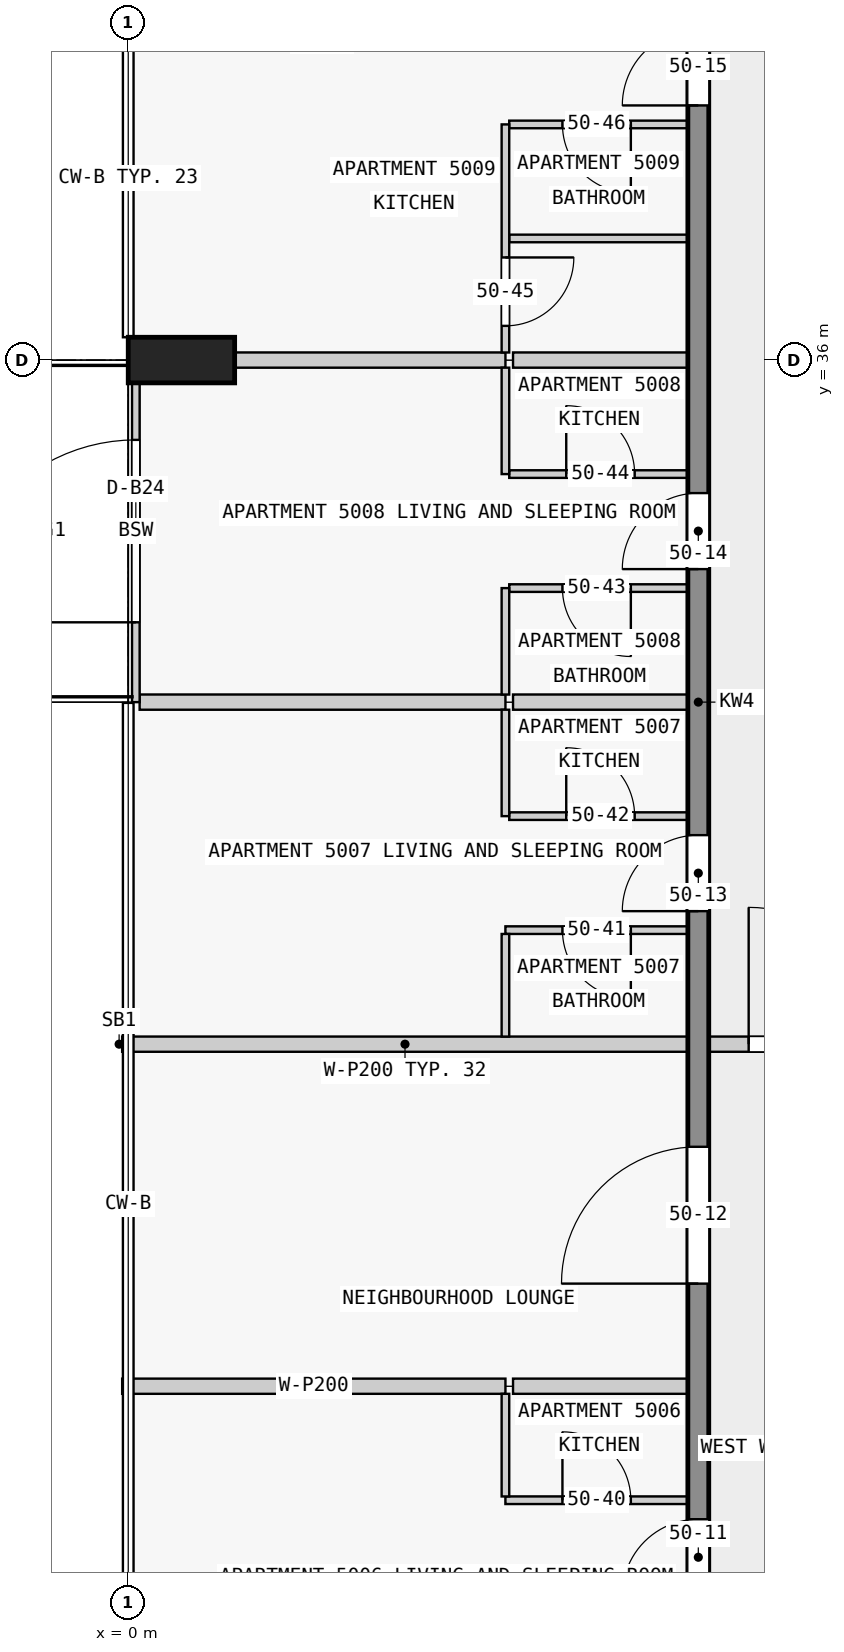
"""IFC4 building model, lengths in metres.
Left out: names, types, materials, properties, quantities, classifications, styles, units other than length and angle.
Written with IfcOpenShell. Run it as: python <this file> out.ifc"""

import sys

from ifc_helpers import new_model, si_unit, direction, frame, frame_2d, origin, origin_2d, place, context, subcontext, project, spatial, rectangle, extrude, element, fill, save


model = new_model("IFC4")
c1 = context("Model", 3, precision=1e-05, world=origin(), true_north=direction((0.0, 1.0)))
c2 = subcontext(c1, "Body", "Model", "MODEL_VIEW")
j1 = project(units=[si_unit("LENGTHUNIT", "METRE"), si_unit("PLANEANGLEUNIT", "RADIAN")], contexts=[c1])
p1 = place(None, origin())
s1 = spatial("IfcSite", under=j1, at=p1, CompositionType="ELEMENT")
p2 = place(p1, origin())
s2 = spatial("IfcBuilding", under=s1, at=p2, CompositionType="ELEMENT")
p3 = place(p2, frame((0.0, 0.0, 194.4)))
s3 = spatial("IfcBuildingStorey", under=s2, at=p3, CompositionType="ELEMENT", Elevation=194.4)
p4 = place(p3, frame((0.7, 36.0, 0.0), z_axis=(0.0, 0.0, 1.0), x_axis=(0.0, 1.0, 0.0)))
e1 = element("IfcColumn", 1, at=p4, inside=s3, PredefinedType="COLUMN", context=c2, shape_type="SweptSolid", body=[
    extrude(rectangle(XDim=0.6, YDim=1.4, at=origin_2d()), origin(), (0.0, 0.0, 1.0), 3.5),
])
p5 = place(p3, frame((7.5, 18.0, 0.0), z_axis=(0.0, 0.0, 1.0), x_axis=(0.0, 1.0, 0.0)))
e2 = element("IfcWall", 2, at=p5, inside=s3, PredefinedType="SHEAR", context=c2, shape_type="SweptSolid", body=[
    extrude(rectangle(XDim=27.0, YDim=0.275, at=frame_2d((13.5, 0.0))), origin(), (0.0, 0.0, 1.0), 3.25),
])
p6 = place(p5, frame((1.75, 0.0, 0.0)))
e3 = element("IfcOpeningElement", 3, at=p6, cuts=e2, PredefinedType="OPENING", context=c2, shape_type="SweptSolid", body=[
    extrude(rectangle(XDim=1.0, YDim=2.1, at=frame_2d((0.5, 1.05))), frame((0.0, 0.147, 0.0), z_axis=(0.0, -1.0, 0.0), x_axis=(1.0, 0.0, 0.0)), (0.0, 0.0, 1.0), 0.295),
])
p7 = place(p5, frame((5.85, 0.0, 0.0)))
e4 = element("IfcOpeningElement", 4, at=p7, cuts=e2, PredefinedType="OPENING", context=c2, shape_type="SweptSolid", body=[
    extrude(rectangle(XDim=1.8, YDim=2.1, at=frame_2d((0.9, 1.05))), frame((0.0, 0.147, 0.0), z_axis=(0.0, -1.0, 0.0), x_axis=(1.0, 0.0, 0.0)), (0.0, 0.0, 1.0), 0.295),
])
p8 = place(p5, frame((10.75, 0.0, 0.0)))
e5 = element("IfcOpeningElement", 5, at=p8, cuts=e2, PredefinedType="OPENING", context=c2, shape_type="SweptSolid", body=[
    extrude(rectangle(XDim=1.0, YDim=2.1, at=frame_2d((0.5, 1.05))), frame((0.0, 0.147, 0.0), z_axis=(0.0, -1.0, 0.0), x_axis=(1.0, 0.0, 0.0)), (0.0, 0.0, 1.0), 0.295),
])
p9 = place(p5, frame((15.25, 0.0, 0.0)))
e6 = element("IfcOpeningElement", 6, at=p9, cuts=e2, PredefinedType="OPENING", context=c2, shape_type="SweptSolid", body=[
    extrude(rectangle(XDim=1.0, YDim=2.1, at=frame_2d((0.5, 1.05))), frame((0.0, 0.147, 0.0), z_axis=(0.0, -1.0, 0.0), x_axis=(1.0, 0.0, 0.0)), (0.0, 0.0, 1.0), 0.295),
])
p10 = place(p5, frame((21.35, 0.0, 0.0)))
e7 = element("IfcOpeningElement", 7, at=p10, cuts=e2, PredefinedType="OPENING", context=c2, shape_type="SweptSolid", body=[
    extrude(rectangle(XDim=1.0, YDim=2.1, at=frame_2d((0.5, 1.05))), frame((0.0, 0.147, 0.0), z_axis=(0.0, -1.0, 0.0), x_axis=(1.0, 0.0, 0.0)), (0.0, 0.0, 1.0), 0.295),
])
p11 = place(p3, frame((0.1, 31.5, 0.0), z_axis=(0.0, 0.0, 1.0), x_axis=(0.0, 1.0, 0.0)))
e8 = element("IfcWall", 8, at=p11, inside=s3, PredefinedType="STANDARD", context=c2, shape_type="SweptSolid", body=[
    extrude(rectangle(XDim=4.5, YDim=0.1, at=frame_2d((2.25, 0.0))), origin(), (0.0, 0.0, 1.0), 3.25),
])
p12 = place(p11, frame((1.05, 0.0, 0.0)))
e9 = element("IfcOpeningElement", 9, at=p12, cuts=e8, PredefinedType="OPENING", context=c2, shape_type="SweptSolid", body=[
    extrude(rectangle(XDim=2.4, YDim=2.4, at=frame_2d((1.2, 1.2))), frame((0.0, 0.06, 0.0), z_axis=(0.0, -1.0, 0.0), x_axis=(1.0, 0.0, 0.0)), (0.0, 0.0, 1.0), 0.12),
])
p13 = place(p3, frame((4.962, 21.0, 0.0), z_axis=(0.0, 0.0, 1.0), x_axis=(1.0, 0.0, 0.0)))
e10 = element("IfcWall", 10, at=p13, inside=s3, PredefinedType="PARTITIONING", context=c2, shape_type="SweptSolid", body=[
    extrude(rectangle(XDim=2.4, YDim=0.1, at=frame_2d((1.2, 0.0))), origin(), (0.0, 0.0, 1.0), 3.25),
])
p14 = place(p13, frame((0.75, 0.0, 0.0)))
e11 = element("IfcOpeningElement", 11, at=p14, cuts=e10, PredefinedType="OPENING", context=c2, shape_type="SweptSolid", body=[
    extrude(rectangle(XDim=0.9, YDim=2.1, at=frame_2d((0.45, 1.05))), frame((0.0, 0.06, 0.0), z_axis=(0.0, -1.0, 0.0), x_axis=(1.0, 0.0, 0.0)), (0.0, 0.0, 1.0), 0.12),
])
p15 = place(p3, frame((7.363, 22.5, 0.0), z_axis=(0.0, 0.0, 1.0), x_axis=(-1.0, 0.0, 0.0)))
e12 = element("IfcWall", 12, at=p15, inside=s3, PredefinedType="PARTITIONING", context=c2, shape_type="SweptSolid", body=[
    extrude(rectangle(XDim=2.3, YDim=0.2, at=frame_2d((1.15, 0.0))), origin(), (0.0, 0.0, 1.0), 3.25),
])
p16 = place(p3, frame((-0.08, 22.5, 0.0), z_axis=(0.0, 0.0, 1.0), x_axis=(1.0, 0.0, 0.0)))
e13 = element("IfcWall", 13, at=p16, inside=s3, PredefinedType="PARTITIONING", context=c2, shape_type="SweptSolid", body=[
    extrude(rectangle(XDim=5.042, YDim=0.2, at=frame_2d((2.521, 0.0))), origin(), (0.0, 0.0, 1.0), 3.25),
])
p17 = place(p3, frame((7.363, 27.0, 0.0), z_axis=(0.0, 0.0, 1.0), x_axis=(-1.0, 0.0, 0.0)))
e14 = element("IfcWall", 14, at=p17, inside=s3, PredefinedType="PARTITIONING", context=c2, shape_type="SweptSolid", body=[
    extrude(rectangle(XDim=7.443, YDim=0.2, at=frame_2d((3.721, 0.0))), origin(), (0.0, 0.0, 1.0), 3.25),
])
p18 = place(p3, frame((7.363, 28.5, 0.0), z_axis=(0.0, 0.0, 1.0), x_axis=(-1.0, 0.0, 0.0)))
e15 = element("IfcWall", 15, at=p18, inside=s3, PredefinedType="PARTITIONING", context=c2, shape_type="SweptSolid", body=[
    extrude(rectangle(XDim=2.4, YDim=0.1, at=frame_2d((1.2, 0.0))), origin(), (0.0, 0.0, 1.0), 3.25),
])
p19 = place(p18, frame((0.75, 0.0, 0.0)))
e16 = element("IfcOpeningElement", 16, at=p19, cuts=e15, PredefinedType="OPENING", context=c2, shape_type="SweptSolid", body=[
    extrude(rectangle(XDim=0.9, YDim=2.1, at=frame_2d((0.45, 1.05))), frame((0.0, 0.06, 0.0), z_axis=(0.0, -1.0, 0.0), x_axis=(1.0, 0.0, 0.0)), (0.0, 0.0, 1.0), 0.12),
])
p20 = place(p3, frame((5.012, 30.0, 0.0), z_axis=(0.0, 0.0, 1.0), x_axis=(1.0, 0.0, 0.0)))
e17 = element("IfcWall", 17, at=p20, inside=s3, PredefinedType="PARTITIONING", context=c2, shape_type="SweptSolid", body=[
    extrude(rectangle(XDim=2.35, YDim=0.1, at=frame_2d((1.175, 0.0))), origin(), (0.0, 0.0, 1.0), 3.25),
])
p21 = place(p20, frame((0.75, 0.0, 0.0)))
e18 = element("IfcOpeningElement", 18, at=p21, cuts=e17, PredefinedType="OPENING", context=c2, shape_type="SweptSolid", body=[
    extrude(rectangle(XDim=0.9, YDim=2.1, at=frame_2d((0.45, 1.05))), frame((0.0, 0.06, 0.0), z_axis=(0.0, -1.0, 0.0), x_axis=(1.0, 0.0, 0.0)), (0.0, 0.0, 1.0), 0.12),
])
p22 = place(p3, frame((7.363, 31.5, 0.0), z_axis=(0.0, 0.0, 1.0), x_axis=(-1.0, 0.0, 0.0)))
e19 = element("IfcWall", 19, at=p22, inside=s3, PredefinedType="PARTITIONING", context=c2, shape_type="SweptSolid", body=[
    extrude(rectangle(XDim=2.3, YDim=0.2, at=frame_2d((1.15, 0.0))), origin(), (0.0, 0.0, 1.0), 3.25),
])
p23 = place(p3, frame((0.15, 31.5, 0.0), z_axis=(0.0, 0.0, 1.0), x_axis=(1.0, 0.0, 0.0)))
e20 = element("IfcWall", 20, at=p23, inside=s3, PredefinedType="PARTITIONING", context=c2, shape_type="SweptSolid", body=[
    extrude(rectangle(XDim=4.812, YDim=0.2, at=frame_2d((2.406, 0.0))), origin(), (0.0, 0.0, 1.0), 3.25),
])
p24 = place(p3, frame((7.363, 33.0, 0.0), z_axis=(0.0, 0.0, 1.0), x_axis=(-1.0, 0.0, 0.0)))
e21 = element("IfcWall", 21, at=p24, inside=s3, PredefinedType="PARTITIONING", context=c2, shape_type="SweptSolid", body=[
    extrude(rectangle(XDim=2.35, YDim=0.1, at=frame_2d((1.175, 0.0))), origin(), (0.0, 0.0, 1.0), 3.25),
])
p25 = place(p24, frame((0.75, 0.0, 0.0)))
e22 = element("IfcOpeningElement", 22, at=p25, cuts=e21, PredefinedType="OPENING", context=c2, shape_type="SweptSolid", body=[
    extrude(rectangle(XDim=0.9, YDim=2.1, at=frame_2d((0.45, 1.05))), frame((0.0, 0.06, 0.0), z_axis=(0.0, -1.0, 0.0), x_axis=(1.0, 0.0, 0.0)), (0.0, 0.0, 1.0), 0.12),
])
p26 = place(p3, frame((5.012, 34.5, 0.0), z_axis=(0.0, 0.0, 1.0), x_axis=(1.0, 0.0, 0.0)))
e23 = element("IfcWall", 23, at=p26, inside=s3, PredefinedType="PARTITIONING", context=c2, shape_type="SweptSolid", body=[
    extrude(rectangle(XDim=2.35, YDim=0.1, at=frame_2d((1.175, 0.0))), origin(), (0.0, 0.0, 1.0), 3.25),
])
p27 = place(p26, frame((0.75, 0.0, 0.0)))
e24 = element("IfcOpeningElement", 24, at=p27, cuts=e23, PredefinedType="OPENING", context=c2, shape_type="SweptSolid", body=[
    extrude(rectangle(XDim=0.9, YDim=2.1, at=frame_2d((0.45, 1.05))), frame((0.0, 0.06, 0.0), z_axis=(0.0, -1.0, 0.0), x_axis=(1.0, 0.0, 0.0)), (0.0, 0.0, 1.0), 0.12),
])
p28 = place(p3, frame((7.363, 36.0, 0.0), z_axis=(0.0, 0.0, 1.0), x_axis=(-1.0, 0.0, 0.0)))
e25 = element("IfcWall", 25, at=p28, inside=s3, PredefinedType="PARTITIONING", context=c2, shape_type="SweptSolid", body=[
    extrude(rectangle(XDim=2.3, YDim=0.2, at=frame_2d((1.15, 0.0))), origin(), (0.0, 0.0, 1.0), 3.25),
])
p29 = place(p3, frame((1.4, 36.0, 0.0), z_axis=(0.0, 0.0, 1.0), x_axis=(1.0, 0.0, 0.0)))
e26 = element("IfcWall", 26, at=p29, inside=s3, PredefinedType="PARTITIONING", context=c2, shape_type="SweptSolid", body=[
    extrude(rectangle(XDim=3.562, YDim=0.2, at=frame_2d((1.781, 0.0))), origin(), (0.0, 0.0, 1.0), 3.25),
])
p30 = place(p3, frame((7.363, 37.6, 0.0), z_axis=(0.0, 0.0, 1.0), x_axis=(-1.0, 0.0, 0.0)))
e27 = element("IfcWall", 27, at=p30, inside=s3, PredefinedType="PARTITIONING", context=c2, shape_type="SweptSolid", body=[
    extrude(rectangle(XDim=2.35, YDim=0.1, at=frame_2d((1.175, 0.0))), origin(), (0.0, 0.0, 1.0), 3.25),
])
p31 = place(p3, frame((7.363, 39.1, 0.0), z_axis=(0.0, 0.0, 1.0), x_axis=(-1.0, 0.0, 0.0)))
e28 = element("IfcWall", 28, at=p31, inside=s3, PredefinedType="PARTITIONING", context=c2, shape_type="SweptSolid", body=[
    extrude(rectangle(XDim=2.35, YDim=0.1, at=frame_2d((1.175, 0.0))), origin(), (0.0, 0.0, 1.0), 3.25),
])
p32 = place(p31, frame((0.75, 0.0, 0.0)))
e29 = element("IfcOpeningElement", 29, at=p32, cuts=e28, PredefinedType="OPENING", context=c2, shape_type="SweptSolid", body=[
    extrude(rectangle(XDim=0.9, YDim=2.1, at=frame_2d((0.45, 1.05))), frame((0.0, 0.06, 0.0), z_axis=(0.0, -1.0, 0.0), x_axis=(1.0, 0.0, 0.0)), (0.0, 0.0, 1.0), 0.12),
])
for number, where, z_axis, x_axis in (
    (30, (4.962, 22.4, 0.0), (0.0, 0.0, 1.0), (0.0, -1.0, 0.0)),
    (31, (4.962, 28.45, 0.0), (0.0, 0.0, 1.0), (0.0, -1.0, 0.0)),
):
    element("IfcWall", number, at=place(p3, frame(where, z_axis=z_axis, x_axis=x_axis)), inside=s3, PredefinedType="PARTITIONING", context=c2, shape_type="SweptSolid", body=[
        extrude(rectangle(XDim=1.35, YDim=0.1, at=frame_2d((0.675, 0.0))), origin(), (0.0, 0.0, 1.0), 3.25),
    ])
for number, where, z_axis, x_axis in (
    (32, (4.962, 31.4, 0.0), (0.0, 0.0, 1.0), (0.0, -1.0, 0.0)),
    (33, (4.962, 33.0, 0.0), (0.0, 0.0, 1.0), (0.0, -1.0, 0.0)),
    (34, (4.962, 35.9, 0.0), (0.0, 0.0, 1.0), (0.0, -1.0, 0.0)),
):
    element("IfcWall", number, at=place(p3, frame(where, z_axis=z_axis, x_axis=x_axis)), inside=s3, PredefinedType="PARTITIONING", context=c2, shape_type="SweptSolid", body=[
        extrude(rectangle(XDim=1.4, YDim=0.1, at=frame_2d((0.7, 0.0))), origin(), (0.0, 0.0, 1.0), 3.25),
    ])
p33 = place(p3, frame((4.962, 39.1, 0.0), z_axis=(0.0, 0.0, 1.0), x_axis=(0.0, -1.0, 0.0)))
e35 = element("IfcWall", 35, at=p33, inside=s3, PredefinedType="PARTITIONING", context=c2, shape_type="SweptSolid", body=[
    extrude(rectangle(XDim=3.0, YDim=0.1, at=frame_2d((1.5, 0.0))), origin(), (0.0, 0.0, 1.0), 3.25),
])
p34 = place(p33, frame((1.75, 0.0, 0.0)))
e36 = element("IfcOpeningElement", 36, at=p34, cuts=e35, PredefinedType="OPENING", context=c2, shape_type="SweptSolid", body=[
    extrude(rectangle(XDim=0.9, YDim=2.1, at=frame_2d((0.45, 1.05))), frame((0.0, 0.06, 0.0), z_axis=(0.0, -1.0, 0.0), x_axis=(1.0, 0.0, 0.0)), (0.0, 0.0, 1.0), 0.12),
])
p35 = place(p3, frame((7.462, 27.0, 0.0), z_axis=(0.0, 0.0, 1.0), x_axis=(1.0, 0.0, 0.0)))
e37 = element("IfcWall", 37, at=p35, inside=s3, PredefinedType="PARTITIONING", context=c2, shape_type="SweptSolid", body=[
    extrude(rectangle(XDim=3.175, YDim=0.2, at=frame_2d((1.587, 0.0))), origin(), (0.0, 0.0, 1.0), 3.25),
])
p36 = place(p35, frame((0.7, 0.0, 0.0)))
e38 = element("IfcOpeningElement", 38, at=p36, cuts=e37, PredefinedType="OPENING", context=c2, shape_type="SweptSolid", body=[
    extrude(rectangle(XDim=1.8, YDim=2.1, at=frame_2d((0.9, 1.05))), frame((0.0, 0.11, 0.0), z_axis=(0.0, -1.0, 0.0), x_axis=(1.0, 0.0, 0.0)), (0.0, 0.0, 1.0), 0.22),
])
p37 = place(p12, origin())
e39 = element("IfcDoor", 39, at=p37, inside=s3, OperationType="SINGLE_SWING_LEFT", PredefinedType="DOOR", context=c2, shape_type="SweptSolid", body=[
    extrude(rectangle(XDim=2.4, YDim=2.4, at=frame_2d((1.2, 1.2))), frame((0.0, 0.025, 0.0), z_axis=(0.0, -1.0, 0.0), x_axis=(1.0, 0.0, 0.0)), (0.0, 0.0, 1.0), 0.05),
])
fill(e9, e39)
p38 = place(p6, origin())
e40 = element("IfcDoor", 40, at=p38, inside=s3, OperationType="SINGLE_SWING_LEFT", PredefinedType="DOOR", context=c2, shape_type="SweptSolid", body=[
    extrude(rectangle(XDim=1.0, YDim=2.1, at=frame_2d((0.5, 1.05))), frame((0.0, 0.025, 0.0), z_axis=(0.0, -1.0, 0.0), x_axis=(1.0, 0.0, 0.0)), (0.0, 0.0, 1.0), 0.05),
])
fill(e3, e40)
p39 = place(p7, origin())
e41 = element("IfcDoor", 41, at=p39, inside=s3, OperationType="SINGLE_SWING_LEFT", PredefinedType="DOOR", context=c2, shape_type="SweptSolid", body=[
    extrude(rectangle(XDim=1.8, YDim=2.1, at=frame_2d((0.9, 1.05))), frame((0.0, 0.025, 0.0), z_axis=(0.0, -1.0, 0.0), x_axis=(1.0, 0.0, 0.0)), (0.0, 0.0, 1.0), 0.05),
])
fill(e4, e41)
p40 = place(p8, origin())
e42 = element("IfcDoor", 42, at=p40, inside=s3, OperationType="SINGLE_SWING_LEFT", PredefinedType="DOOR", context=c2, shape_type="SweptSolid", body=[
    extrude(rectangle(XDim=1.0, YDim=2.1, at=frame_2d((0.5, 1.05))), frame((0.0, 0.025, 0.0), z_axis=(0.0, -1.0, 0.0), x_axis=(1.0, 0.0, 0.0)), (0.0, 0.0, 1.0), 0.05),
])
fill(e5, e42)
p41 = place(p9, origin())
e43 = element("IfcDoor", 43, at=p41, inside=s3, OperationType="SINGLE_SWING_RIGHT", PredefinedType="DOOR", context=c2, shape_type="SweptSolid", body=[
    extrude(rectangle(XDim=1.0, YDim=2.1, at=frame_2d((0.5, 1.05))), frame((0.0, 0.025, 0.0), z_axis=(0.0, -1.0, 0.0), x_axis=(1.0, 0.0, 0.0)), (0.0, 0.0, 1.0), 0.05),
])
fill(e6, e43)
p42 = place(p10, origin())
e44 = element("IfcDoor", 44, at=p42, inside=s3, OperationType="SINGLE_SWING_RIGHT", PredefinedType="DOOR", context=c2, shape_type="SweptSolid", body=[
    extrude(rectangle(XDim=1.0, YDim=2.1, at=frame_2d((0.5, 1.05))), frame((0.0, 0.025, 0.0), z_axis=(0.0, -1.0, 0.0), x_axis=(1.0, 0.0, 0.0)), (0.0, 0.0, 1.0), 0.05),
])
fill(e7, e44)
p43 = place(p36, origin())
e45 = element("IfcDoor", 45, at=p43, inside=s3, OperationType="SINGLE_SWING_RIGHT", PredefinedType="DOOR", context=c2, shape_type="SweptSolid", body=[
    extrude(rectangle(XDim=1.8, YDim=2.1, at=frame_2d((0.9, 1.05))), frame((0.0, 0.025, 0.0), z_axis=(0.0, -1.0, 0.0), x_axis=(1.0, 0.0, 0.0)), (0.0, 0.0, 1.0), 0.05),
])
fill(e38, e45)
p44 = place(p14, origin())
e46 = element("IfcDoor", 46, at=p44, inside=s3, OperationType="SINGLE_SWING_RIGHT", PredefinedType="DOOR", context=c2, shape_type="SweptSolid", body=[
    extrude(rectangle(XDim=0.9, YDim=2.1, at=frame_2d((0.45, 1.05))), frame((0.0, 0.025, 0.0), z_axis=(0.0, -1.0, 0.0), x_axis=(1.0, 0.0, 0.0)), (0.0, 0.0, 1.0), 0.05),
])
fill(e11, e46)
p45 = place(p19, origin())
e47 = element("IfcDoor", 47, at=p45, inside=s3, OperationType="SINGLE_SWING_RIGHT", PredefinedType="DOOR", context=c2, shape_type="SweptSolid", body=[
    extrude(rectangle(XDim=0.9, YDim=2.1, at=frame_2d((0.45, 1.05))), frame((0.0, 0.025, 0.0), z_axis=(0.0, -1.0, 0.0), x_axis=(1.0, 0.0, 0.0)), (0.0, 0.0, 1.0), 0.05),
])
fill(e16, e47)
p46 = place(p21, origin())
e48 = element("IfcDoor", 48, at=p46, inside=s3, OperationType="SINGLE_SWING_RIGHT", PredefinedType="DOOR", context=c2, shape_type="SweptSolid", body=[
    extrude(rectangle(XDim=0.9, YDim=2.1, at=frame_2d((0.45, 1.05))), frame((0.0, 0.025, 0.0), z_axis=(0.0, -1.0, 0.0), x_axis=(1.0, 0.0, 0.0)), (0.0, 0.0, 1.0), 0.05),
])
fill(e18, e48)
p47 = place(p25, origin())
e49 = element("IfcDoor", 49, at=p47, inside=s3, OperationType="SINGLE_SWING_RIGHT", PredefinedType="DOOR", context=c2, shape_type="SweptSolid", body=[
    extrude(rectangle(XDim=0.9, YDim=2.1, at=frame_2d((0.45, 1.05))), frame((0.0, 0.025, 0.0), z_axis=(0.0, -1.0, 0.0), x_axis=(1.0, 0.0, 0.0)), (0.0, 0.0, 1.0), 0.05),
])
fill(e22, e49)
p48 = place(p27, origin())
e50 = element("IfcDoor", 50, at=p48, inside=s3, OperationType="SINGLE_SWING_RIGHT", PredefinedType="DOOR", context=c2, shape_type="SweptSolid", body=[
    extrude(rectangle(XDim=0.9, YDim=2.1, at=frame_2d((0.45, 1.05))), frame((0.0, 0.025, 0.0), z_axis=(0.0, -1.0, 0.0), x_axis=(1.0, 0.0, 0.0)), (0.0, 0.0, 1.0), 0.05),
])
fill(e24, e50)
p49 = place(p34, origin())
e51 = element("IfcDoor", 51, at=p49, inside=s3, OperationType="SINGLE_SWING_RIGHT", PredefinedType="DOOR", context=c2, shape_type="SweptSolid", body=[
    extrude(rectangle(XDim=0.9, YDim=2.1, at=frame_2d((0.45, 1.05))), frame((0.0, 0.025, 0.0), z_axis=(0.0, -1.0, 0.0), x_axis=(1.0, 0.0, 0.0)), (0.0, 0.0, 1.0), 0.05),
])
fill(e36, e51)
p50 = place(p32, origin())
e52 = element("IfcDoor", 52, at=p50, inside=s3, OperationType="SINGLE_SWING_RIGHT", PredefinedType="DOOR", context=c2, shape_type="SweptSolid", body=[
    extrude(rectangle(XDim=0.9, YDim=2.1, at=frame_2d((0.45, 1.05))), frame((0.0, 0.025, 0.0), z_axis=(0.0, -1.0, 0.0), x_axis=(1.0, 0.0, 0.0)), (0.0, 0.0, 1.0), 0.05),
])
fill(e29, e52)
save(model, sys.argv[1])
